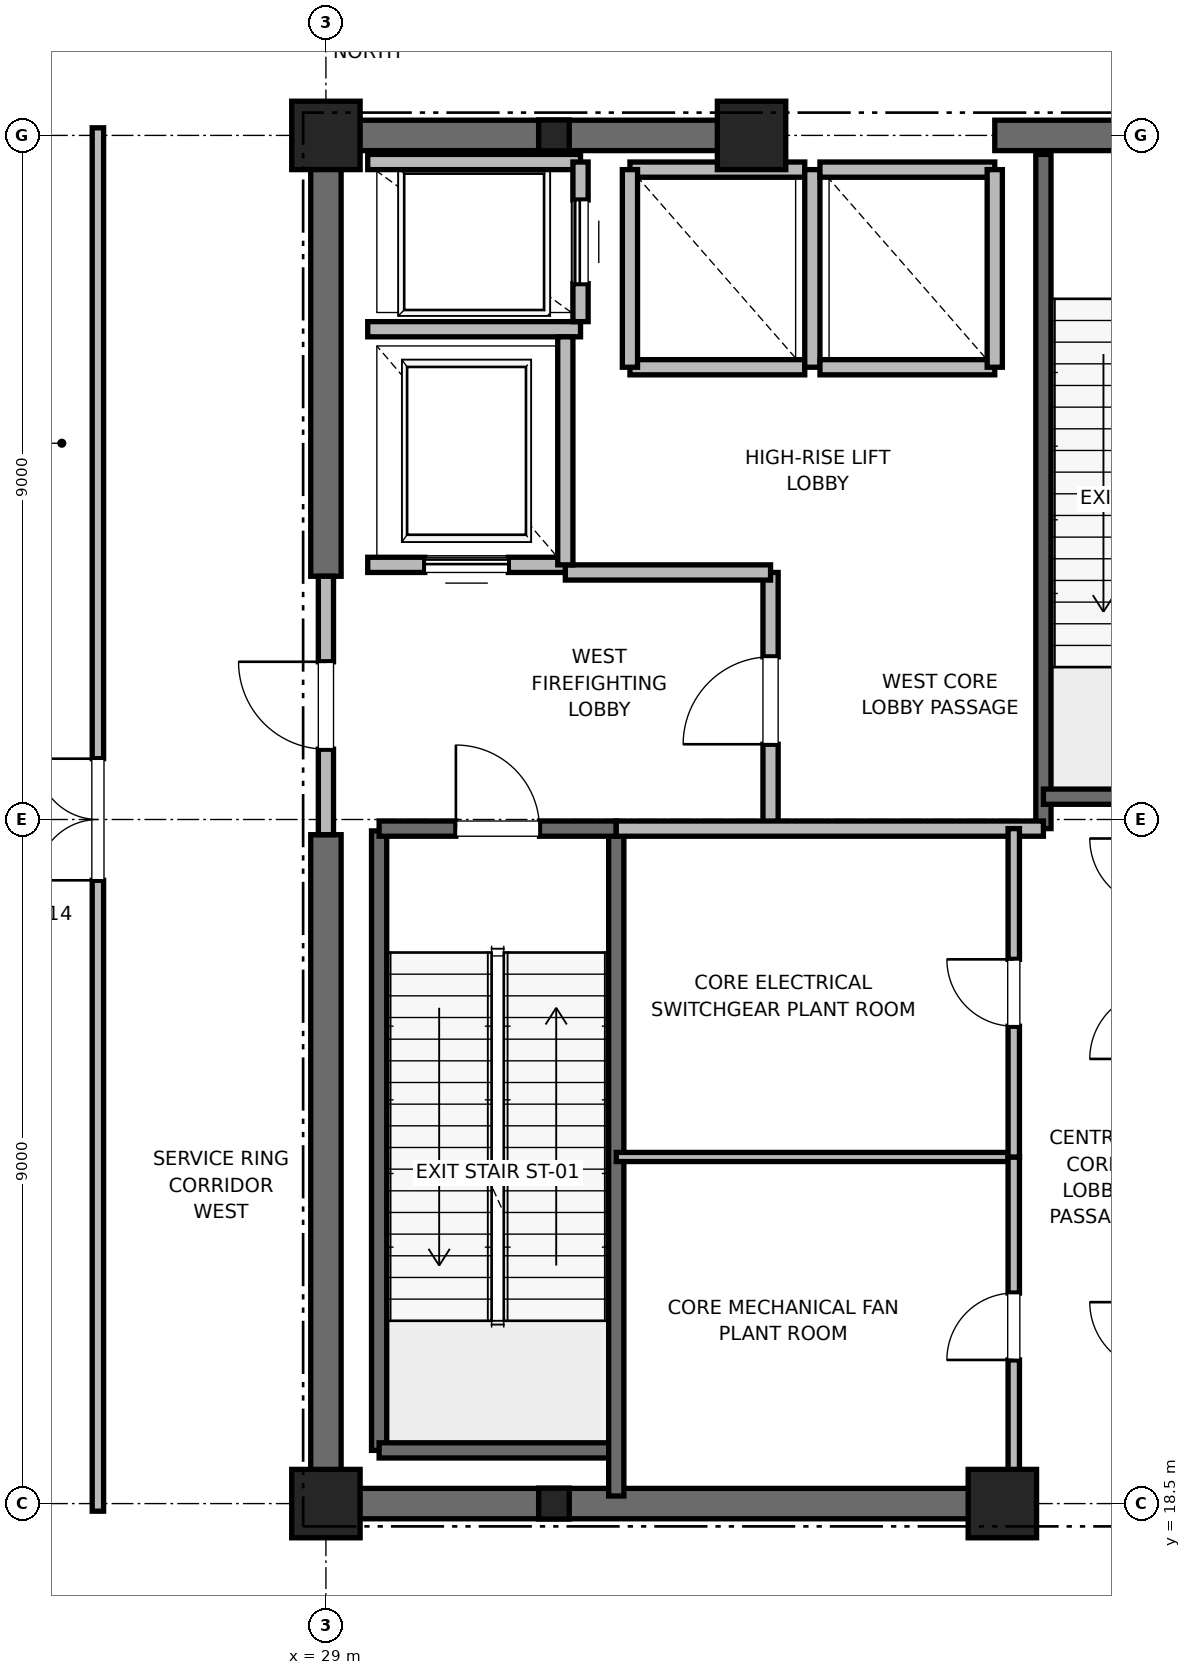
"""IFC4 building model, lengths in metres.
Left out: names, types, materials, properties, quantities, classifications, styles, units other than length and angle.
Written with IfcOpenShell. Run it as: python <this file> out.ifc"""

import sys

from ifc_helpers import new_model, si_unit, direction, frame, frame_2d, origin, origin_2d, place, context, subcontext, project, spatial, rectangle, i_section, extrude, element, fill, save


model = new_model("IFC4")
c1 = context("Model", 3, precision=1e-05, world=origin(), true_north=direction((0.0, 1.0)))
c2 = subcontext(c1, "Body", "Model", "MODEL_VIEW")
j1 = project(units=[si_unit("LENGTHUNIT", "METRE"), si_unit("PLANEANGLEUNIT", "RADIAN")], contexts=[c1])
p1 = place(None, origin())
s1 = spatial("IfcSite", under=j1, at=p1, CompositionType="ELEMENT")
p2 = place(p1, origin())
s2 = spatial("IfcBuilding", under=s1, at=p2, CompositionType="ELEMENT")
p3 = place(p2, frame((0.0, 0.0, 342.8)))
s3 = spatial("IfcBuildingStorey", under=s2, at=p3, CompositionType="ELEMENT", Elevation=342.8)
for number, where, z_axis, x_axis in (
    (1, (29.0, 18.5, 0.0), (0.0, 0.0, 1.0), (1.0, 0.0, 0.0)),
    (2, (29.0, 36.5, 0.0), (0.0, 0.0, 1.0), (1.0, 0.0, 0.0)),
    (3, (37.9, 18.5, 0.0), (0.0, 0.0, 1.0), (1.0, 0.0, 0.0)),
    (4, (34.6, 36.5, 0.0), (0.0, 0.0, 1.0), (1.0, 0.0, 0.0)),
):
    element("IfcColumn", number, at=place(p3, frame(where, z_axis=z_axis, x_axis=x_axis)), inside=s3, PredefinedType="PILASTER", context=c2, shape_type="SweptSolid", body=[
        extrude(rectangle(XDim=0.9, YDim=0.9, at=origin_2d()), origin(), (0.0, 0.0, 1.0), 6.0),
    ])
for number, where, z_axis, x_axis in (
    (5, (32.0, 18.5, 0.0), (0.0, 0.0, 1.0), (1.0, 0.0, 0.0)),
    (6, (32.0, 36.5, 0.0), (0.0, 0.0, 1.0), (1.0, 0.0, 0.0)),
):
    element("IfcColumn", number, at=place(p3, frame(where, z_axis=z_axis, x_axis=x_axis)), inside=s3, PredefinedType="COLUMN", context=c2, shape_type="SweptSolid", body=[
        extrude(i_section(OverallWidth=0.403, OverallDepth=0.406, WebThickness=0.027, FlangeThickness=0.043, FilletRadius=0.015, at=origin_2d()), origin(), (0.0, 0.0, 1.0), 6.0),
    ])
p4 = place(p3, frame((29.0, 18.5, 0.0), z_axis=(0.0, 0.0, 1.0), x_axis=(1.0, 0.0, 0.0)))
e7 = element("IfcWall", 7, at=p4, inside=s3, PredefinedType="SHEAR", context=c2, shape_type="SweptSolid", body=[
    extrude(rectangle(XDim=9.2, YDim=0.4, at=frame_2d((4.6, 0.0))), origin(), (0.0, 0.0, 1.0), 5.7),
])
p5 = place(p3, frame((29.0, 36.5, 0.0), z_axis=(0.0, 0.0, 1.0), x_axis=(1.0, 0.0, 0.0)))
e8 = element("IfcWall", 8, at=p5, inside=s3, PredefinedType="SHEAR", context=c2, shape_type="SweptSolid", body=[
    extrude(rectangle(XDim=5.8, YDim=0.4, at=frame_2d((2.9, 0.0))), origin(), (0.0, 0.0, 1.0), 5.7),
])
p6 = place(p3, frame((37.8, 36.5, 0.0), z_axis=(0.0, 0.0, 1.0), x_axis=(1.0, 0.0, 0.0)))
e9 = element("IfcWall", 9, at=p6, inside=s3, PredefinedType="SHEAR", context=c2, shape_type="SweptSolid", body=[
    extrude(rectangle(XDim=4.4, YDim=0.4, at=frame_2d((2.2, 0.0))), origin(), (0.0, 0.0, 1.0), 5.7),
])
p7 = place(p6, frame((1.65, 0.0, 0.0)))
e10 = element("IfcOpeningElement", 10, at=p7, cuts=e9, PredefinedType="OPENING", context=c2, shape_type="SweptSolid", body=[
    extrude(rectangle(XDim=1.1, YDim=2.15, at=frame_2d((0.55, 1.075))), frame((0.0, 0.2, 0.0), z_axis=(0.0, -1.0, 0.0), x_axis=(1.0, 0.0, 0.0)), (0.0, 0.0, 1.0), 0.4),
])
p8 = place(p3, frame((29.0, 18.5, 0.0), z_axis=(0.0, 0.0, 1.0), x_axis=(0.0, 1.0, 0.0)))
e11 = element("IfcWall", 11, at=p8, inside=s3, PredefinedType="SHEAR", context=c2, shape_type="SweptSolid", body=[
    extrude(rectangle(XDim=8.8, YDim=0.4, at=frame_2d((4.4, 0.0))), origin(), (0.0, 0.0, 1.0), 5.7),
])
p9 = place(p3, frame((29.0, 30.7, 0.0), z_axis=(0.0, 0.0, 1.0), x_axis=(0.0, 1.0, 0.0)))
e12 = element("IfcWall", 12, at=p9, inside=s3, PredefinedType="SHEAR", context=c2, shape_type="SweptSolid", body=[
    extrude(rectangle(XDim=5.8, YDim=0.4, at=frame_2d((2.9, 0.0))), origin(), (0.0, 0.0, 1.0), 5.7),
])
p10 = place(p3, frame((29.7, 19.2, 0.0), z_axis=(0.0, 0.0, 1.0), x_axis=(0.0, 1.0, 0.0)))
e13 = element("IfcWall", 13, at=p10, inside=s3, PredefinedType="SOLIDWALL", context=c2, shape_type="SweptSolid", body=[
    extrude(rectangle(XDim=8.15, YDim=0.2, at=frame_2d((4.075, 0.0))), origin(), (0.0, 0.0, 1.0), 5.7),
])
p11 = place(p3, frame((29.7, 19.2, 0.0), z_axis=(0.0, 0.0, 1.0), x_axis=(1.0, 0.0, 0.0)))
e14 = element("IfcWall", 14, at=p11, inside=s3, PredefinedType="SOLIDWALL", context=c2, shape_type="SweptSolid", body=[
    extrude(rectangle(XDim=3.12, YDim=0.2, at=frame_2d((1.56, 0.0))), origin(), (0.0, 0.0, 1.0), 5.7),
])
p12 = place(p3, frame((32.82, 18.6, 0.0), z_axis=(0.0, 0.0, 1.0), x_axis=(0.0, 1.0, 0.0)))
e15 = element("IfcWall", 15, at=p12, inside=s3, PredefinedType="SOLIDWALL", context=c2, shape_type="SweptSolid", body=[
    extrude(rectangle(XDim=8.78, YDim=0.2, at=frame_2d((4.39, 0.0))), origin(), (0.0, 0.0, 1.0), 5.7),
])
p13 = place(p3, frame((29.7, 27.38, 0.0), z_axis=(0.0, 0.0, 1.0), x_axis=(1.0, 0.0, 0.0)))
e16 = element("IfcWall", 16, at=p13, inside=s3, PredefinedType="SOLIDWALL", context=c2, shape_type="SweptSolid", body=[
    extrude(rectangle(XDim=3.12, YDim=0.2, at=frame_2d((1.56, 0.0))), origin(), (0.0, 0.0, 1.0), 5.7),
])
p14 = place(p13, frame((1.01, 0.0, 0.0)))
e17 = element("IfcOpeningElement", 17, at=p14, cuts=e16, PredefinedType="OPENING", context=c2, shape_type="SweptSolid", body=[
    extrude(rectangle(XDim=1.1, YDim=2.15, at=frame_2d((0.55, 1.075))), frame((0.0, 0.1, 0.0), z_axis=(0.0, -1.0, 0.0), x_axis=(1.0, 0.0, 0.0)), (0.0, 0.0, 1.0), 0.2),
])
p15 = place(p3, frame((38.44, 27.38, 0.0), z_axis=(0.0, 0.0, 1.0), x_axis=(0.0, 1.0, 0.0)))
e18 = element("IfcWall", 18, at=p15, inside=s3, PredefinedType="SOLIDWALL", context=c2, shape_type="SweptSolid", body=[
    extrude(rectangle(XDim=8.87, YDim=0.2, at=frame_2d((4.435, 0.0))), origin(), (0.0, 0.0, 1.0), 5.7),
])
p16 = place(p3, frame((38.44, 27.8, 0.0), z_axis=(0.0, 0.0, 1.0), x_axis=(1.0, 0.0, 0.0)))
e19 = element("IfcWall", 19, at=p16, inside=s3, PredefinedType="SOLIDWALL", context=c2, shape_type="SweptSolid", body=[
    extrude(rectangle(XDim=3.32, YDim=0.2, at=frame_2d((1.66, 0.0))), origin(), (0.0, 0.0, 1.0), 5.7),
])
p17 = place(p3, frame((34.85, 27.38, 0.0), z_axis=(0.0, 0.0, 1.0), x_axis=(0.0, 1.0, 0.0)))
e20 = element("IfcWall", 20, at=p17, inside=s3, PredefinedType="PARTITIONING", context=c2, shape_type="SweptSolid", body=[
    extrude(rectangle(XDim=3.37, YDim=0.2, at=frame_2d((1.685, 0.0))), origin(), (0.0, 0.0, 1.0), 5.7),
])
p18 = place(p17, frame((1.11, 0.0, 0.0)))
e21 = element("IfcOpeningElement", 21, at=p18, cuts=e20, PredefinedType="OPENING", context=c2, shape_type="SweptSolid", body=[
    extrude(rectangle(XDim=1.15, YDim=2.2, at=frame_2d((0.575, 1.1))), frame((0.0, 0.1, 0.0), z_axis=(0.0, -1.0, 0.0), x_axis=(1.0, 0.0, 0.0)), (0.0, 0.0, 1.0), 0.2),
])
p19 = place(p3, frame((29.0, 27.3, 0.0), z_axis=(0.0, 0.0, 1.0), x_axis=(0.0, 1.0, 0.0)))
e22 = element("IfcWall", 22, at=p19, inside=s3, PredefinedType="PARTITIONING", context=c2, shape_type="SweptSolid", body=[
    extrude(rectangle(XDim=3.4, YDim=0.2, at=frame_2d((1.7, 0.0))), origin(), (0.0, 0.0, 1.0), 4.78),
])
p20 = place(p19, frame((1.125, 0.0, 0.0)))
e23 = element("IfcOpeningElement", 23, at=p20, cuts=e22, PredefinedType="OPENING", context=c2, shape_type="SweptSolid", body=[
    extrude(rectangle(XDim=1.15, YDim=2.2, at=frame_2d((0.575, 1.1))), frame((0.0, 0.1, 0.0), z_axis=(0.0, -1.0, 0.0), x_axis=(1.0, 0.0, 0.0)), (0.0, 0.0, 1.0), 0.2),
])
p21 = place(p3, frame((32.82, 27.38, 0.0), z_axis=(0.0, 0.0, 1.0), x_axis=(1.0, 0.0, 0.0)))
e24 = element("IfcWall", 24, at=p21, inside=s3, PredefinedType="PARTITIONING", context=c2, shape_type="SweptSolid", body=[
    extrude(rectangle(XDim=5.62, YDim=0.2, at=frame_2d((2.81, 0.0))), origin(), (0.0, 0.0, 1.0), 5.7),
])
p22 = place(p3, frame((32.15, 30.75, 0.0), z_axis=(0.0, 0.0, 1.0), x_axis=(1.0, 0.0, 0.0)))
e25 = element("IfcWall", 25, at=p22, inside=s3, PredefinedType="PARTITIONING", context=c2, shape_type="SweptSolid", body=[
    extrude(rectangle(XDim=2.7, YDim=0.2, at=frame_2d((1.35, 0.0))), origin(), (0.0, 0.0, 1.0), 5.7),
])
p23 = place(p3, frame((29.55, 30.85, 0.0), z_axis=(0.0, 0.0, 1.0), x_axis=(1.0, 0.0, 0.0)))
e26 = element("IfcWall", 26, at=p23, inside=s3, PredefinedType="SOLIDWALL", context=c2, shape_type="SweptSolid", body=[
    extrude(rectangle(XDim=2.6, YDim=0.2, at=frame_2d((1.3, 0.0))), origin(), (0.0, 0.0, 1.0), 4.78),
])
p24 = place(p23, frame((0.75, 0.0, 0.0)))
e27 = element("IfcOpeningElement", 27, at=p24, cuts=e26, PredefinedType="OPENING", context=c2, shape_type="SweptSolid", body=[
    extrude(rectangle(XDim=1.1, YDim=2.2, at=frame_2d((0.55, 1.1))), frame((0.0, 0.1, 0.0), z_axis=(0.0, -1.0, 0.0), x_axis=(1.0, 0.0, 0.0)), (0.0, 0.0, 1.0), 0.2),
])
p25 = place(p3, frame((29.55, 33.95, 0.0), z_axis=(0.0, 0.0, 1.0), x_axis=(1.0, 0.0, 0.0)))
e28 = element("IfcWall", 28, at=p25, inside=s3, PredefinedType="SOLIDWALL", context=c2, shape_type="SweptSolid", body=[
    extrude(rectangle(XDim=2.8, YDim=0.2, at=frame_2d((1.4, 0.0))), origin(), (0.0, 0.0, 1.0), 5.7),
])
p26 = place(p3, frame((32.15, 30.85, 0.0), z_axis=(0.0, 0.0, 1.0), x_axis=(0.0, 1.0, 0.0)))
e29 = element("IfcWall", 29, at=p26, inside=s3, PredefinedType="SOLIDWALL", context=c2, shape_type="SweptSolid", body=[
    extrude(rectangle(XDim=3.0, YDim=0.2, at=frame_2d((1.5, 0.0))), origin(), (0.0, 0.0, 1.0), 5.7),
])
p27 = place(p3, frame((32.35, 36.15, 0.0), z_axis=(0.0, 0.0, 1.0), x_axis=(-1.0, 0.0, 0.0)))
e30 = element("IfcWall", 30, at=p27, inside=s3, PredefinedType="SOLIDWALL", context=c2, shape_type="SweptSolid", body=[
    extrude(rectangle(XDim=2.8, YDim=0.2, at=frame_2d((1.4, 0.0))), origin(), (0.0, 0.0, 1.0), 4.753),
])
p28 = place(p3, frame((32.35, 34.05, 0.0), z_axis=(0.0, 0.0, 1.0), x_axis=(0.0, 1.0, 0.0)))
e31 = element("IfcWall", 31, at=p28, inside=s3, PredefinedType="SOLIDWALL", context=c2, shape_type="SweptSolid", body=[
    extrude(rectangle(XDim=2.1, YDim=0.2, at=frame_2d((1.05, 0.0))), origin(), (0.0, 0.0, 1.0), 5.7),
])
p29 = place(p28, frame((0.5, 0.0, 0.0)))
e32 = element("IfcOpeningElement", 32, at=p29, cuts=e31, PredefinedType="OPENING", context=c2, shape_type="SweptSolid", body=[
    extrude(rectangle(XDim=1.1, YDim=2.2, at=frame_2d((0.55, 1.1))), frame((0.0, 0.1, 0.0), z_axis=(0.0, -1.0, 0.0), x_axis=(1.0, 0.0, 0.0)), (0.0, 0.0, 1.0), 0.2),
])
p30 = place(p3, frame((33.0, 33.45, 0.0), z_axis=(0.0, 0.0, 1.0), x_axis=(1.0, 0.0, 0.0)))
e33 = element("IfcWall", 33, at=p30, inside=s3, PredefinedType="SOLIDWALL", context=c2, shape_type="SweptSolid", body=[
    extrude(rectangle(XDim=2.3, YDim=0.2, at=frame_2d((1.15, 0.0))), origin(), (0.0, 0.0, 1.0), 5.7),
])
p31 = place(p3, frame((35.3, 36.05, 0.0), z_axis=(0.0, 0.0, 1.0), x_axis=(-1.0, 0.0, 0.0)))
e34 = element("IfcWall", 34, at=p31, inside=s3, PredefinedType="SOLIDWALL", context=c2, shape_type="SweptSolid", body=[
    extrude(rectangle(XDim=2.3, YDim=0.2, at=frame_2d((1.15, 0.0))), origin(), (0.0, 0.0, 1.0), 4.78),
])
p32 = place(p3, frame((33.0, 36.05, 0.0), z_axis=(0.0, 0.0, 1.0), x_axis=(0.0, -1.0, 0.0)))
e35 = element("IfcWall", 35, at=p32, inside=s3, PredefinedType="SOLIDWALL", context=c2, shape_type="SweptSolid", body=[
    extrude(rectangle(XDim=2.6, YDim=0.2, at=frame_2d((1.3, 0.0))), origin(), (0.0, 0.0, 1.0), 5.7),
])
p33 = place(p3, frame((35.4, 33.45, 0.0), z_axis=(0.0, 0.0, 1.0), x_axis=(0.0, 1.0, 0.0)))
e36 = element("IfcWall", 36, at=p33, inside=s3, PredefinedType="SOLIDWALL", context=c2, shape_type="SweptSolid", body=[
    extrude(rectangle(XDim=2.6, YDim=0.2, at=frame_2d((1.3, 0.0))), origin(), (0.0, 0.0, 1.0), 4.78),
])
p34 = place(p3, frame((35.5, 33.45, 0.0), z_axis=(0.0, 0.0, 1.0), x_axis=(1.0, 0.0, 0.0)))
e37 = element("IfcWall", 37, at=p34, inside=s3, PredefinedType="SOLIDWALL", context=c2, shape_type="SweptSolid", body=[
    extrude(rectangle(XDim=2.3, YDim=0.2, at=frame_2d((1.15, 0.0))), origin(), (0.0, 0.0, 1.0), 5.7),
])
p35 = place(p3, frame((37.8, 36.05, 0.0), z_axis=(0.0, 0.0, 1.0), x_axis=(-1.0, 0.0, 0.0)))
e38 = element("IfcWall", 38, at=p35, inside=s3, PredefinedType="SOLIDWALL", context=c2, shape_type="SweptSolid", body=[
    extrude(rectangle(XDim=2.3, YDim=0.2, at=frame_2d((1.15, 0.0))), origin(), (0.0, 0.0, 1.0), 4.78),
])
p36 = place(p3, frame((37.8, 33.45, 0.0), z_axis=(0.0, 0.0, 1.0), x_axis=(0.0, 1.0, 0.0)))
e39 = element("IfcWall", 39, at=p36, inside=s3, PredefinedType="SOLIDWALL", context=c2, shape_type="SweptSolid", body=[
    extrude(rectangle(XDim=2.6, YDim=0.2, at=frame_2d((1.3, 0.0))), origin(), (0.0, 0.0, 1.0), 4.78),
])
p37 = place(p3, frame((32.82, 23.06, 0.0), z_axis=(0.0, 0.0, 1.0), x_axis=(1.0, 0.0, 0.0)))
e40 = element("IfcWall", 40, at=p37, inside=s3, PredefinedType="PARTITIONING", context=c2, shape_type="SweptSolid", body=[
    extrude(rectangle(XDim=5.23, YDim=0.12, at=frame_2d((2.615, 0.0))), origin(), (0.0, 0.0, 1.0), 2.85),
])
p38 = place(p3, frame((38.05, 18.6, 0.0), z_axis=(0.0, 0.0, 1.0), x_axis=(0.0, 1.0, 0.0)))
e41 = element("IfcWall", 41, at=p38, inside=s3, PredefinedType="PARTITIONING", context=c2, shape_type="SweptSolid", body=[
    extrude(rectangle(XDim=4.46, YDim=0.15, at=frame_2d((2.23, 0.0))), origin(), (0.0, 0.0, 1.0), 2.85),
])
p39 = place(p38, frame((1.79, 0.0, 0.0)))
e42 = element("IfcOpeningElement", 42, at=p39, cuts=e41, PredefinedType="OPENING", context=c2, shape_type="SweptSolid", body=[
    extrude(rectangle(XDim=0.88, YDim=2.1, at=frame_2d((0.44, 1.05))), frame((0.0, 0.075, 0.0), z_axis=(0.0, -1.0, 0.0), x_axis=(1.0, 0.0, 0.0)), (0.0, 0.0, 1.0), 0.15),
])
p40 = place(p3, frame((38.05, 23.06, 0.0), z_axis=(0.0, 0.0, 1.0), x_axis=(0.0, 1.0, 0.0)))
e43 = element("IfcWall", 43, at=p40, inside=s3, PredefinedType="PARTITIONING", context=c2, shape_type="SweptSolid", body=[
    extrude(rectangle(XDim=4.32, YDim=0.15, at=frame_2d((2.16, 0.0))), origin(), (0.0, 0.0, 1.0), 2.85),
])
p41 = place(p40, frame((1.72, 0.0, 0.0)))
e44 = element("IfcOpeningElement", 44, at=p41, cuts=e43, PredefinedType="OPENING", context=c2, shape_type="SweptSolid", body=[
    extrude(rectangle(XDim=0.88, YDim=2.1, at=frame_2d((0.44, 1.05))), frame((0.0, 0.075, 0.0), z_axis=(0.0, -1.0, 0.0), x_axis=(1.0, 0.0, 0.0)), (0.0, 0.0, 1.0), 0.15),
])
p42 = place(p3, frame((26.0, 18.4, 0.0), z_axis=(0.0, 0.0, 1.0), x_axis=(0.0, 1.0, 0.0)))
e45 = element("IfcWall", 45, at=p42, inside=s3, PredefinedType="PARTITIONING", context=c2, shape_type="SweptSolid", body=[
    extrude(rectangle(XDim=18.2, YDim=0.15, at=frame_2d((9.1, 0.0))), origin(), (0.0, 0.0, 1.0), 2.85),
])
p43 = place(p42, frame((8.3, 0.0, 0.0)))
e46 = element("IfcOpeningElement", 46, at=p43, cuts=e45, PredefinedType="OPENING", context=c2, shape_type="SweptSolid", body=[
    extrude(rectangle(XDim=1.6, YDim=2.25, at=frame_2d((0.8, 1.125))), frame((0.0, 0.075, 0.0), z_axis=(0.0, -1.0, 0.0), x_axis=(1.0, 0.0, 0.0)), (0.0, 0.0, 1.0), 0.15),
])
p44 = place(p14, origin())
e47 = element("IfcDoor", 47, at=p44, inside=s3, OperationType="SINGLE_SWING_LEFT", PredefinedType="DOOR", context=c2, shape_type="SweptSolid", body=[
    extrude(rectangle(XDim=1.1, YDim=2.15, at=frame_2d((0.55, 1.075))), frame((0.0, 0.025, 0.0), z_axis=(0.0, -1.0, 0.0), x_axis=(1.0, 0.0, 0.0)), (0.0, 0.0, 1.0), 0.05),
])
fill(e17, e47)
p45 = place(p18, origin())
e48 = element("IfcDoor", 48, at=p45, inside=s3, OperationType="SINGLE_SWING_LEFT", PredefinedType="DOOR", context=c2, shape_type="SweptSolid", body=[
    extrude(rectangle(XDim=1.15, YDim=2.2, at=frame_2d((0.575, 1.1))), frame((0.0, 0.025, 0.0), z_axis=(0.0, -1.0, 0.0), x_axis=(1.0, 0.0, 0.0)), (0.0, 0.0, 1.0), 0.05),
])
fill(e21, e48)
p46 = place(p20, origin())
e49 = element("IfcDoor", 49, at=p46, inside=s3, OperationType="SINGLE_SWING_RIGHT", PredefinedType="DOOR", context=c2, shape_type="SweptSolid", body=[
    extrude(rectangle(XDim=1.15, YDim=2.2, at=frame_2d((0.575, 1.1))), frame((0.0, 0.025, 0.0), z_axis=(0.0, -1.0, 0.0), x_axis=(1.0, 0.0, 0.0)), (0.0, 0.0, 1.0), 0.05),
])
fill(e23, e49)
p47 = place(p24, origin())
e50 = element("IfcDoor", 50, at=p47, inside=s3, OperationType="SLIDING_TO_RIGHT", PredefinedType="DOOR", context=c2, shape_type="SweptSolid", body=[
    extrude(rectangle(XDim=1.1, YDim=2.2, at=frame_2d((0.55, 1.1))), frame((0.0, 0.025, 0.0), z_axis=(0.0, -1.0, 0.0), x_axis=(1.0, 0.0, 0.0)), (0.0, 0.0, 1.0), 0.05),
])
fill(e27, e50)
p48 = place(p29, origin())
e51 = element("IfcDoor", 51, at=p48, inside=s3, OperationType="SLIDING_TO_RIGHT", PredefinedType="DOOR", context=c2, shape_type="SweptSolid", body=[
    extrude(rectangle(XDim=1.1, YDim=2.2, at=frame_2d((0.55, 1.1))), frame((0.0, 0.025, 0.0), z_axis=(0.0, -1.0, 0.0), x_axis=(1.0, 0.0, 0.0)), (0.0, 0.0, 1.0), 0.05),
])
fill(e32, e51)
p49 = place(p39, origin())
e52 = element("IfcDoor", 52, at=p49, inside=s3, OperationType="SINGLE_SWING_LEFT", PredefinedType="DOOR", context=c2, shape_type="SweptSolid", body=[
    extrude(rectangle(XDim=0.88, YDim=2.1, at=frame_2d((0.44, 1.05))), frame((0.0, 0.025, 0.0), z_axis=(0.0, -1.0, 0.0), x_axis=(1.0, 0.0, 0.0)), (0.0, 0.0, 1.0), 0.05),
])
fill(e42, e52)
p50 = place(p41, origin())
e53 = element("IfcDoor", 53, at=p50, inside=s3, OperationType="SINGLE_SWING_RIGHT", PredefinedType="DOOR", context=c2, shape_type="SweptSolid", body=[
    extrude(rectangle(XDim=0.88, YDim=2.1, at=frame_2d((0.44, 1.05))), frame((0.0, 0.025, 0.0), z_axis=(0.0, -1.0, 0.0), x_axis=(1.0, 0.0, 0.0)), (0.0, 0.0, 1.0), 0.05),
])
fill(e44, e53)
p51 = place(p43, origin())
e54 = element("IfcDoor", 54, at=p51, inside=s3, OperationType="DOUBLE_DOOR_SINGLE_SWING", PredefinedType="DOOR", context=c2, shape_type="SweptSolid", body=[
    extrude(rectangle(XDim=1.6, YDim=2.25, at=frame_2d((0.8, 1.125))), frame((0.0, 0.025, 0.0), z_axis=(0.0, -1.0, 0.0), x_axis=(1.0, 0.0, 0.0)), (0.0, 0.0, 1.0), 0.05),
])
fill(e46, e54)
save(model, sys.argv[1])
